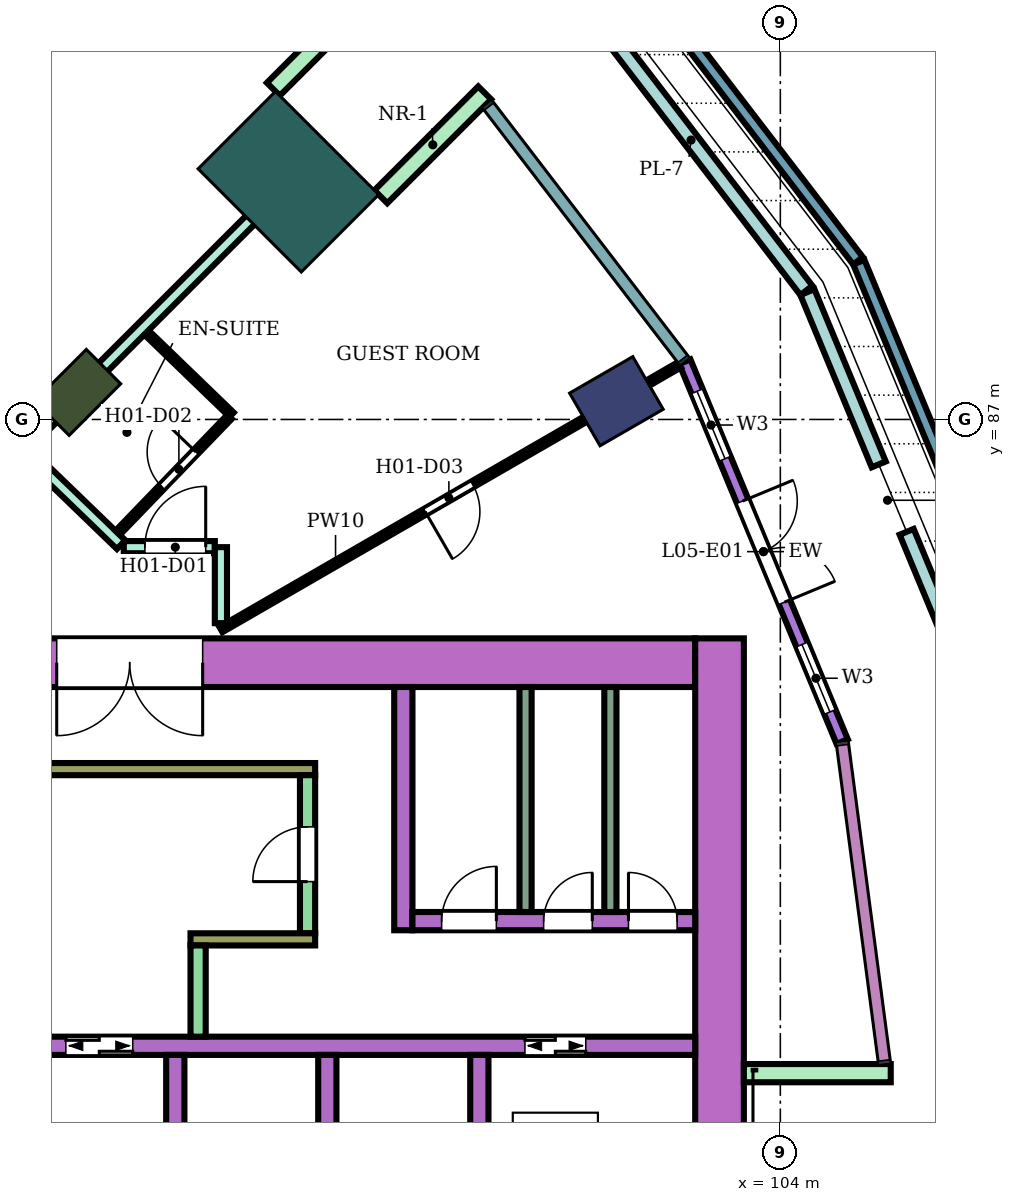
"""IFC4 building model, lengths in metres.
Left out: names, types, materials, properties, quantities, classifications, styles, units other than length and angle.
Written with IfcOpenShell. Run it as: python <this file> out.ifc"""

import sys

from ifc_helpers import new_model, si_unit, direction, frame, frame_2d, origin, origin_2d, place, context, subcontext, project, spatial, rectangle, extrude, element, fill, save


model = new_model("IFC4")
c1 = context("Model", 3, precision=1e-05, world=origin(), true_north=direction((0.0, 1.0)))
c2 = subcontext(c1, "Body", "Model", "MODEL_VIEW")
j1 = project(units=[si_unit("LENGTHUNIT", "METRE"), si_unit("PLANEANGLEUNIT", "RADIAN")], contexts=[c1])
p1 = place(None, origin())
s1 = spatial("IfcSite", under=j1, at=p1, CompositionType="ELEMENT")
p2 = place(p1, origin())
s2 = spatial("IfcBuilding", under=s1, at=p2, CompositionType="ELEMENT")
p3 = place(p2, frame((0.0, 0.0, 28.8)))
s3 = spatial("IfcBuildingStorey", under=s2, at=p3, CompositionType="ELEMENT", Elevation=28.8)
p4 = place(p3, frame((101.304, 87.3, 0.0), z_axis=(0.0, 0.0, 1.0), x_axis=(0.866025403784, 0.5, 0.0)))
e1 = element("IfcColumn", 1, at=p4, inside=s3, PredefinedType="COLUMN", context=c2, shape_type="SweptSolid", body=[
    extrude(rectangle(XDim=1.2, YDim=1.0, at=origin_2d()), origin(), (0.0, 0.0, 1.0), 3.8),
])
p5 = place(p3, frame((92.445, 87.445, 0.0), z_axis=(0.0, 0.0, 1.0), x_axis=(0.707106781187, 0.707106781187, 0.0)))
e2 = element("IfcColumn", 2, at=p5, inside=s3, PredefinedType="COLUMN", context=c2, shape_type="SweptSolid", body=[
    extrude(rectangle(XDim=1.2, YDim=0.8, at=origin_2d()), origin(), (0.0, 0.0, 1.0), 3.8),
])
p6 = place(p3, frame((95.91, 90.91, 0.0), z_axis=(0.0, 0.0, 1.0), x_axis=(0.707106781187, 0.707106781187, 0.0)))
e3 = element("IfcColumn", 3, at=p6, inside=s3, PredefinedType="COLUMN", context=c2, shape_type="SweptSolid", body=[
    extrude(rectangle(XDim=1.8, YDim=2.4, at=origin_2d()), origin(), (0.0, 0.0, 1.0), 3.8),
])
p7 = place(p3, frame((87.9, 83.0, 0.0), z_axis=(0.0, 0.0, 1.0), x_axis=(1.0, 0.0, 0.0)))
e4 = element("IfcWall", 4, at=p7, inside=s3, PredefinedType="SHEAR", context=c2, shape_type="SweptSolid", body=[
    extrude(rectangle(XDim=14.7, YDim=0.8, at=frame_2d((7.35, 0.0))), origin(), (0.0, 0.0, 1.0), 3.48),
])
p8 = place(p7, frame((4.2, 0.0, 0.0)))
e5 = element("IfcOpeningElement", 5, at=p8, cuts=e4, PredefinedType="OPENING", context=c2, shape_type="SweptSolid", body=[
    extrude(rectangle(XDim=2.4, YDim=2.4, at=frame_2d((1.2, 1.2))), frame((0.0, 0.41, 0.0), z_axis=(0.0, -1.0, 0.0), x_axis=(1.0, 0.0, 0.0)), (0.0, 0.0, 1.0), 0.82),
])
p9 = place(p3, frame((103.0, 66.6, 0.0), z_axis=(0.0, 0.0, 1.0), x_axis=(0.0, 1.0, 0.0)))
e6 = element("IfcWall", 6, at=p9, inside=s3, PredefinedType="SHEAR", context=c2, shape_type="SweptSolid", body=[
    extrude(rectangle(XDim=16.8, YDim=0.8, at=frame_2d((8.4, 0.0))), origin(), (0.0, 0.0, 1.0), 3.48),
])
p10 = place(p3, frame((91.7, 76.7, 0.0), z_axis=(0.0, 0.0, 1.0), x_axis=(1.0, 0.0, 0.0)))
e7 = element("IfcWall", 7, at=p10, inside=s3, PredefinedType="SHEAR", context=c2, shape_type="SweptSolid", body=[
    extrude(rectangle(XDim=10.9, YDim=0.3, at=frame_2d((5.45, 0.0))), origin(), (0.0, 0.0, 1.0), 3.48),
])
p11 = place(p10, frame((0.55, 0.0, 0.0)))
e8 = element("IfcOpeningElement", 8, at=p11, cuts=e7, PredefinedType="OPENING", context=c2, shape_type="SweptSolid", body=[
    extrude(rectangle(XDim=1.1, YDim=2.1, at=frame_2d((0.55, 1.05))), frame((0.0, 0.16, 0.0), z_axis=(0.0, -1.0, 0.0), x_axis=(1.0, 0.0, 0.0)), (0.0, 0.0, 1.0), 0.32),
])
p12 = place(p10, frame((8.1, 0.0, 0.0)))
e9 = element("IfcOpeningElement", 9, at=p12, cuts=e7, PredefinedType="OPENING", context=c2, shape_type="SweptSolid", body=[
    extrude(rectangle(XDim=1.0, YDim=2.1, at=frame_2d((0.5, 1.05))), frame((0.0, 0.16, 0.0), z_axis=(0.0, -1.0, 0.0), x_axis=(1.0, 0.0, 0.0)), (0.0, 0.0, 1.0), 0.32),
])
for number, where, z_axis, x_axis in (
    (10, (94.05, 74.0, 0.0), (0.0, 0.0, 1.0), (0.0, 1.0, 0.0)),
    (11, (96.55, 74.0, 0.0), (0.0, 0.0, 1.0), (0.0, 1.0, 0.0)),
    (12, (99.05, 74.0, 0.0), (0.0, 0.0, 1.0), (0.0, 1.0, 0.0)),
):
    element("IfcWall", number, at=place(p3, frame(where, z_axis=z_axis, x_axis=x_axis)), inside=s3, PredefinedType="SHEAR", context=c2, shape_type="SweptSolid", body=[
        extrude(rectangle(XDim=2.55, YDim=0.3, at=frame_2d((1.275, 0.0))), origin(), (0.0, 0.0, 1.0), 3.48),
    ])
p13 = place(p3, frame((91.7, 81.25, 0.0), z_axis=(0.0, 0.0, 1.0), x_axis=(1.0, 0.0, 0.0)))
e13 = element("IfcWall", 13, at=p13, inside=s3, PredefinedType="SHEAR", context=c2, shape_type="SweptSolid", body=[
    extrude(rectangle(XDim=4.65, YDim=0.2, at=frame_2d((2.325, 0.0))), origin(), (0.0, 0.0, 1.0), 3.48),
])
p14 = place(p3, frame((96.225, 78.55, 0.0), z_axis=(0.0, 0.0, 1.0), x_axis=(0.0, 1.0, 0.0)))
e14 = element("IfcWall", 14, at=p14, inside=s3, PredefinedType="SHEAR", context=c2, shape_type="SweptSolid", body=[
    extrude(rectangle(XDim=2.6, YDim=0.25, at=frame_2d((1.3, 0.0))), origin(), (0.0, 0.0, 1.0), 3.48),
])
p15 = place(p14, frame((0.85, 0.0, 0.0)))
e15 = element("IfcOpeningElement", 15, at=p15, cuts=e14, PredefinedType="OPENING", context=c2, shape_type="SweptSolid", body=[
    extrude(rectangle(XDim=0.9, YDim=2.1, at=frame_2d((0.45, 1.05))), frame((0.0, 0.135, 0.0), z_axis=(0.0, -1.0, 0.0), x_axis=(1.0, 0.0, 0.0)), (0.0, 0.0, 1.0), 0.27),
])
p16 = place(p3, frame((94.3, 78.45, 0.0), z_axis=(0.0, 0.0, 1.0), x_axis=(1.0, 0.0, 0.0)))
e16 = element("IfcWall", 16, at=p16, inside=s3, PredefinedType="SHEAR", context=c2, shape_type="SweptSolid", body=[
    extrude(rectangle(XDim=2.05, YDim=0.2, at=frame_2d((1.025, 0.0))), origin(), (0.0, 0.0, 1.0), 3.48),
])
p17 = place(p3, frame((94.425, 76.85, 0.0), z_axis=(0.0, 0.0, 1.0), x_axis=(0.0, 1.0, 0.0)))
e17 = element("IfcWall", 17, at=p17, inside=s3, PredefinedType="SHEAR", context=c2, shape_type="SweptSolid", body=[
    extrude(rectangle(XDim=1.5, YDim=0.25, at=frame_2d((0.75, 0.0))), origin(), (0.0, 0.0, 1.0), 3.48),
])
p18 = place(p3, frame((97.8, 78.6, 0.0), z_axis=(0.0, 0.0, 1.0), x_axis=(0.0, 1.0, 0.0)))
e18 = element("IfcWall", 18, at=p18, inside=s3, PredefinedType="SHEAR", context=c2, shape_type="SweptSolid", body=[
    extrude(rectangle(XDim=4.0, YDim=0.3, at=frame_2d((2.0, 0.0))), origin(), (0.0, 0.0, 1.0), 3.48),
])
p19 = place(p3, frame((97.95, 78.75, 0.0), z_axis=(0.0, 0.0, 1.0), x_axis=(1.0, 0.0, 0.0)))
e19 = element("IfcWall", 19, at=p19, inside=s3, PredefinedType="SHEAR", context=c2, shape_type="SweptSolid", body=[
    extrude(rectangle(XDim=4.65, YDim=0.3, at=frame_2d((2.325, 0.0))), origin(), (0.0, 0.0, 1.0), 3.48),
])
p20 = place(p19, frame((0.48, 0.0, 0.0)))
e20 = element("IfcOpeningElement", 20, at=p20, cuts=e19, PredefinedType="OPENING", context=c2, shape_type="SweptSolid", body=[
    extrude(rectangle(XDim=0.9, YDim=2.1, at=frame_2d((0.45, 1.05))), frame((0.0, 0.16, 0.0), z_axis=(0.0, -1.0, 0.0), x_axis=(1.0, 0.0, 0.0)), (0.0, 0.0, 1.0), 0.32),
])
p21 = place(p19, frame((2.157, 0.0, 0.0)))
e21 = element("IfcOpeningElement", 21, at=p21, cuts=e19, PredefinedType="OPENING", context=c2, shape_type="SweptSolid", body=[
    extrude(rectangle(XDim=0.8, YDim=2.1, at=frame_2d((0.4, 1.05))), frame((0.0, 0.16, 0.0), z_axis=(0.0, -1.0, 0.0), x_axis=(1.0, 0.0, 0.0)), (0.0, 0.0, 1.0), 0.32),
])
p22 = place(p19, frame((3.552, 0.0, 0.0)))
e22 = element("IfcOpeningElement", 22, at=p22, cuts=e19, PredefinedType="OPENING", context=c2, shape_type="SweptSolid", body=[
    extrude(rectangle(XDim=0.8, YDim=2.1, at=frame_2d((0.4, 1.05))), frame((0.0, 0.16, 0.0), z_axis=(0.0, -1.0, 0.0), x_axis=(1.0, 0.0, 0.0)), (0.0, 0.0, 1.0), 0.32),
])
p23 = place(p3, frame((105.017, 81.703, 0.0), z_axis=(0.0, 0.0, 1.0), x_axis=(-0.382694096902, 0.923875115043, 0.0)))
e23 = element("IfcWall", 23, at=p23, inside=s3, PredefinedType="NOTDEFINED", context=c2, shape_type="SweptSolid", body=[
    extrude(rectangle(XDim=6.761, YDim=0.2, at=frame_2d((3.38, 0.0))), origin(), (0.0, 0.0, 1.0), 3.8),
])
p24 = place(p23, frame((0.527, 0.0, 0.9)))
e24 = element("IfcOpeningElement", 24, at=p24, cuts=e23, PredefinedType="OPENING", context=c2, shape_type="SweptSolid", body=[
    extrude(rectangle(XDim=1.2, YDim=2.4, at=frame_2d((0.6, 1.2))), frame((0.0, 0.11, 0.0), z_axis=(0.0, -1.0, 0.0), x_axis=(1.0, 0.0, 0.0)), (0.0, 0.0, 1.0), 0.22),
])
p25 = place(p23, frame((2.48, 0.0, 0.0)))
e25 = element("IfcOpeningElement", 25, at=p25, cuts=e23, PredefinedType="OPENING", context=c2, shape_type="SweptSolid", body=[
    extrude(rectangle(XDim=1.8, YDim=2.4, at=frame_2d((0.9, 1.2))), frame((0.0, 0.11, 0.0), z_axis=(0.0, -1.0, 0.0), x_axis=(1.0, 0.0, 0.0)), (0.0, 0.0, 1.0), 0.22),
])
p26 = place(p23, frame((5.034, 0.0, 0.9)))
e26 = element("IfcOpeningElement", 26, at=p26, cuts=e23, PredefinedType="OPENING", context=c2, shape_type="SweptSolid", body=[
    extrude(rectangle(XDim=1.2, YDim=2.4, at=frame_2d((0.6, 1.2))), frame((0.0, 0.11, 0.0), z_axis=(0.0, -1.0, 0.0), x_axis=(1.0, 0.0, 0.0)), (0.0, 0.0, 1.0), 0.22),
])
for number, where, z_axis, x_axis in (
    (27, (103.4, 76.25, 0.0), (0.0, 0.0, 1.0), (1.0, 0.0, 0.0)),
    (28, (97.43, 90.662, 0.0), (0.0, 0.0, 1.0), (0.707, 0.707, 0.0)),
    (29, (95.662, 92.43, 0.0), (0.0, 0.0, 1.0), (0.707, 0.707, 0.0)),
):
    element("IfcWall", number, at=place(p3, frame(where, z_axis=z_axis, x_axis=x_axis)), inside=s3, PredefinedType="NOTDEFINED", context=c2, shape_type="SweptSolid", body=[
        extrude(rectangle(XDim=2.416, YDim=0.3, at=frame_2d((1.208, 0.0))), origin(), (0.0, 0.0, 1.0), 3.8),
    ])
p27 = place(p3, frame((100.654, 95.635, 0.0), z_axis=(0.0, 0.0, 1.0), x_axis=(0.608742572971, -0.793367808682, 0.0)))
e30 = element("IfcWall", 30, at=p27, inside=s3, PredefinedType="PARAPET", context=c2, shape_type="SweptSolid", body=[
    extrude(rectangle(XDim=7.596, YDim=0.2, at=frame_2d((3.798, 0.0))), origin(), (0.0, 0.0, 1.0), 1.1),
])
p28 = place(p3, frame((105.291, 89.586, 0.0), z_axis=(0.0, 0.0, 1.0), x_axis=(0.382690553965, -0.923876582616, 0.0)))
e31 = element("IfcWall", 31, at=p28, inside=s3, PredefinedType="PARAPET", context=c2, shape_type="SweptSolid", body=[
    extrude(rectangle(XDim=7.595, YDim=0.2, at=frame_2d((3.798, 0.0))), origin(), (0.0, 0.0, 1.0), 1.1),
])
p29 = place(p3, frame((100.635, 94.067, 0.0), z_axis=(0.0, 0.0, 1.0), x_axis=(0.608758005668, -0.793355967101, 0.0)))
e32 = element("IfcWall", 32, at=p29, inside=s3, PredefinedType="USERDEFINED", context=c2, shape_type="SweptSolid", body=[
    extrude(rectangle(XDim=6.232, YDim=0.25, at=frame_2d((3.116, 0.0))), origin(), (0.0, 0.0, 1.0), 0.6),
])
for number, where, z_axis, x_axis in (
    (33, (104.445, 89.094, 0.0), (0.0, 0.0, 1.0), (0.383, -0.924, 0.0)),
    (34, (106.077, 85.152, 0.0), (0.0, 0.0, 1.0), (0.383, -0.924, 0.0)),
):
    element("IfcWall", number, at=place(p3, frame(where, z_axis=z_axis, x_axis=x_axis)), inside=s3, PredefinedType="USERDEFINED", context=c2, shape_type="SweptSolid", body=[
        extrude(rectangle(XDim=3.067, YDim=0.25, at=frame_2d((1.533, 0.0))), origin(), (0.0, 0.0, 1.0), 0.6),
    ])
p30 = place(p3, frame((88.465, 89.473, 0.0), z_axis=(0.0, 0.0, 1.0), x_axis=(0.719457552421, -0.694536413922, 0.0)))
e35 = element("IfcWall", 35, at=p30, inside=s3, PredefinedType="PARTITIONING", context=c2, shape_type="SweptSolid", body=[
    extrude(rectangle(XDim=6.524, YDim=0.2, at=frame_2d((3.262, 0.0))), origin(), (0.0, 0.0, 1.0), 3.35),
])
p31 = place(p30, frame((2.719, 0.0, 0.0)))
e36 = element("IfcOpeningElement", 36, at=p31, cuts=e35, PredefinedType="OPENING", context=c2, shape_type="SweptSolid", body=[
    extrude(rectangle(XDim=1.0, YDim=2.1, at=frame_2d((0.5, 1.05))), frame((0.0, 0.11, 0.0), z_axis=(0.0, -1.0, 0.0), x_axis=(1.0, 0.0, 0.0)), (0.0, 0.0, 1.0), 0.22),
])
p32 = place(p3, frame((88.4, 89.538, 0.0), z_axis=(0.0, 0.0, 1.0), x_axis=(0.5002401188, 0.865886726739, 0.0)))
e37 = element("IfcWall", 37, at=p32, inside=s3, PredefinedType="PARTITIONING", context=c2, shape_type="SweptSolid", body=[
    extrude(rectangle(XDim=9.008, YDim=0.2, at=frame_2d((4.504, 0.0))), origin(), (0.0, 0.0, 1.0), 3.35),
])
p33 = place(p3, frame((91.594, 86.591, 0.0), z_axis=(0.0, 0.0, 1.0), x_axis=(0.707214399597, 0.706999146394, 0.0)))
e38 = element("IfcWall", 38, at=p33, inside=s3, PredefinedType="PARTITIONING", context=c2, shape_type="SweptSolid", body=[
    extrude(rectangle(XDim=6.805, YDim=0.2, at=frame_2d((3.403, 0.0))), origin(), (0.0, 0.0, 1.0), 3.35),
])
p34 = place(p3, frame((93.203, 84.9, 0.0), z_axis=(0.0, 0.0, 1.0), x_axis=(1.0, 0.0, 0.0)))
e39 = element("IfcWall", 39, at=p34, inside=s3, PredefinedType="PARTITIONING", context=c2, shape_type="SweptSolid", body=[
    extrude(rectangle(XDim=1.497, YDim=0.2, at=frame_2d((0.749, 0.0))), origin(), (0.0, 0.0, 1.0), 3.35),
])
p35 = place(p34, frame((0.347, 0.0, 0.0)))
e40 = element("IfcOpeningElement", 40, at=p35, cuts=e39, PredefinedType="OPENING", context=c2, shape_type="SweptSolid", body=[
    extrude(rectangle(XDim=1.0, YDim=2.1, at=frame_2d((0.5, 1.05))), frame((0.0, 0.11, 0.0), z_axis=(0.0, -1.0, 0.0), x_axis=(1.0, 0.0, 0.0)), (0.0, 0.0, 1.0), 0.22),
])
p36 = place(p3, frame((94.8, 83.65, 0.0), z_axis=(0.0, 0.0, 1.0), x_axis=(0.0, 1.0, 0.0)))
e41 = element("IfcWall", 41, at=p36, inside=s3, PredefinedType="PARTITIONING", context=c2, shape_type="SweptSolid", body=[
    extrude(rectangle(XDim=1.25, YDim=0.2, at=frame_2d((0.625, 0.0))), origin(), (0.0, 0.0, 1.0), 3.35),
])
p37 = place(p3, frame((93.103, 85.136, 0.0), z_axis=(0.0, 0.0, 1.0), x_axis=(0.694324808789, 0.719661767708, 0.0)))
e42 = element("IfcWall", 42, at=p37, inside=s3, PredefinedType="PARTITIONING", context=c2, shape_type="SweptSolid", body=[
    extrude(rectangle(XDim=2.65, YDim=0.1, at=frame_2d((1.325, 0.0))), origin(), (0.0, 0.0, 1.0), 3.35),
])
p38 = place(p37, frame((1.05, 0.0, 0.0)))
e43 = element("IfcOpeningElement", 43, at=p38, cuts=e42, PredefinedType="OPENING", context=c2, shape_type="SweptSolid", body=[
    extrude(rectangle(XDim=0.8, YDim=2.1, at=frame_2d((0.4, 1.05))), frame((0.0, 0.06, 0.0), z_axis=(0.0, -1.0, 0.0), x_axis=(1.0, 0.0, 0.0)), (0.0, 0.0, 1.0), 0.12),
])
p39 = place(p3, frame((93.581, 88.425, 0.0), z_axis=(0.0, 0.0, 1.0), x_axis=(0.719336381931, -0.694661910307, 0.0)))
e44 = element("IfcWall", 44, at=p39, inside=s3, PredefinedType="PARTITIONING", context=c2, shape_type="SweptSolid", body=[
    extrude(rectangle(XDim=1.939, YDim=0.1, at=frame_2d((0.97, 0.0))), origin(), (0.0, 0.0, 1.0), 3.35),
])
p40 = place(p3, frame((94.8, 83.545, 0.0), z_axis=(0.0, 0.0, 1.0), x_axis=(0.86602264145, 0.500004784474, 0.0)))
e45 = element("IfcWall", 45, at=p40, inside=s3, PredefinedType="PARTITIONING", context=c2, shape_type="SweptSolid", body=[
    extrude(rectangle(XDim=8.708, YDim=0.1, at=frame_2d((4.354, 0.0))), origin(), (0.0, 0.0, 1.0), 3.35),
])
p41 = place(p40, frame((3.879, 0.0, 0.0)))
e46 = element("IfcOpeningElement", 46, at=p41, cuts=e45, PredefinedType="OPENING", context=c2, shape_type="SweptSolid", body=[
    extrude(rectangle(XDim=0.9, YDim=2.1, at=frame_2d((0.45, 1.05))), frame((0.0, 0.06, 0.0), z_axis=(0.0, -1.0, 0.0), x_axis=(1.0, 0.0, 0.0)), (0.0, 0.0, 1.0), 0.12),
])
for number, where, z_axis, x_axis in (
    (47, (99.81, 78.9, 0.0), (0.0, 0.0, 1.0), (0.0, 1.0, 0.0)),
    (48, (101.205, 78.9, 0.0), (0.0, 0.0, 1.0), (0.0, 1.0, 0.0)),
):
    element("IfcWall", number, at=place(p3, frame(where, z_axis=z_axis, x_axis=x_axis)), inside=s3, PredefinedType="PARTITIONING", context=c2, shape_type="SweptSolid", body=[
        extrude(rectangle(XDim=3.7, YDim=0.2, at=frame_2d((1.85, 0.0))), origin(), (0.0, 0.0, 1.0), 3.48),
    ])
p42 = place(p24, origin())
e49 = element("IfcWindow", 49, at=p42, inside=s3, PartitioningType="SINGLE_PANEL", PredefinedType="WINDOW", context=c2, shape_type="SweptSolid", body=[
    extrude(rectangle(XDim=1.2, YDim=2.4, at=frame_2d((0.6, 1.2))), frame((0.0, 0.03, 0.0), z_axis=(0.0, -1.0, 0.0), x_axis=(1.0, 0.0, 0.0)), (0.0, 0.0, 1.0), 0.06),
])
fill(e24, e49)
p43 = place(p25, frame((1.8, 0.0, 0.0), z_axis=(0.0, 0.0, 1.0), x_axis=(-1.0, 0.0, 0.0)))
e50 = element("IfcDoor", 50, at=p43, inside=s3, OperationType="DOUBLE_DOOR_SINGLE_SWING", PredefinedType="DOOR", context=c2, shape_type="SweptSolid", body=[
    extrude(rectangle(XDim=1.8, YDim=2.4, at=frame_2d((0.9, 1.2))), frame((0.0, 0.025, 0.0), z_axis=(0.0, -1.0, 0.0), x_axis=(1.0, 0.0, 0.0)), (0.0, 0.0, 1.0), 0.05),
])
fill(e25, e50)
p44 = place(p26, origin())
e51 = element("IfcWindow", 51, at=p44, inside=s3, PartitioningType="SINGLE_PANEL", PredefinedType="WINDOW", context=c2, shape_type="SweptSolid", body=[
    extrude(rectangle(XDim=1.2, YDim=2.4, at=frame_2d((0.6, 1.2))), frame((0.0, 0.03, 0.0), z_axis=(0.0, -1.0, 0.0), x_axis=(1.0, 0.0, 0.0)), (0.0, 0.0, 1.0), 0.06),
])
fill(e26, e51)
p45 = place(p35, origin())
e52 = element("IfcDoor", 52, at=p45, inside=s3, OperationType="SINGLE_SWING_RIGHT", PredefinedType="DOOR", context=c2, shape_type="SweptSolid", body=[
    extrude(rectangle(XDim=1.0, YDim=2.1, at=frame_2d((0.5, 1.05))), frame((0.0, 0.025, 0.0), z_axis=(0.0, -1.0, 0.0), x_axis=(1.0, 0.0, 0.0)), (0.0, 0.0, 1.0), 0.05),
])
fill(e40, e52)
p46 = place(p38, origin())
e53 = element("IfcDoor", 53, at=p46, inside=s3, OperationType="SINGLE_SWING_RIGHT", PredefinedType="DOOR", context=c2, shape_type="SweptSolid", body=[
    extrude(rectangle(XDim=0.8, YDim=2.1, at=frame_2d((0.4, 1.05))), frame((0.0, 0.025, 0.0), z_axis=(0.0, -1.0, 0.0), x_axis=(1.0, 0.0, 0.0)), (0.0, 0.0, 1.0), 0.05),
])
fill(e43, e53)
p47 = place(p41, frame((0.9, 0.0, 0.0), z_axis=(0.0, 0.0, 1.0), x_axis=(-1.0, 0.0, 0.0)))
e54 = element("IfcDoor", 54, at=p47, inside=s3, OperationType="SINGLE_SWING_RIGHT", PredefinedType="DOOR", context=c2, shape_type="SweptSolid", body=[
    extrude(rectangle(XDim=0.9, YDim=2.1, at=frame_2d((0.45, 1.05))), frame((0.0, 0.025, 0.0), z_axis=(0.0, -1.0, 0.0), x_axis=(1.0, 0.0, 0.0)), (0.0, 0.0, 1.0), 0.05),
])
fill(e46, e54)
p48 = place(p11, origin())
e55 = element("IfcDoor", 55, at=p48, inside=s3, OperationType="DOUBLE_DOOR_SLIDING", PredefinedType="DOOR", context=c2, shape_type="SweptSolid", body=[
    extrude(rectangle(XDim=1.1, YDim=2.1, at=frame_2d((0.55, 1.05))), frame((0.0, 0.025, 0.0), z_axis=(0.0, -1.0, 0.0), x_axis=(1.0, 0.0, 0.0)), (0.0, 0.0, 1.0), 0.05),
])
fill(e8, e55)
p49 = place(p12, origin())
e56 = element("IfcDoor", 56, at=p49, inside=s3, OperationType="DOUBLE_DOOR_SLIDING", PredefinedType="DOOR", context=c2, shape_type="SweptSolid", body=[
    extrude(rectangle(XDim=1.0, YDim=2.1, at=frame_2d((0.5, 1.05))), frame((0.0, 0.025, 0.0), z_axis=(0.0, -1.0, 0.0), x_axis=(1.0, 0.0, 0.0)), (0.0, 0.0, 1.0), 0.05),
])
fill(e9, e56)
p50 = place(p15, origin())
e57 = element("IfcDoor", 57, at=p50, inside=s3, OperationType="SINGLE_SWING_LEFT", PredefinedType="DOOR", context=c2, shape_type="SweptSolid", body=[
    extrude(rectangle(XDim=0.9, YDim=2.1, at=frame_2d((0.45, 1.05))), frame((0.0, 0.025, 0.0), z_axis=(0.0, -1.0, 0.0), x_axis=(1.0, 0.0, 0.0)), (0.0, 0.0, 1.0), 0.05),
])
fill(e15, e57)
p51 = place(p20, origin())
e58 = element("IfcDoor", 58, at=p51, inside=s3, OperationType="SINGLE_SWING_RIGHT", PredefinedType="DOOR", context=c2, shape_type="SweptSolid", body=[
    extrude(rectangle(XDim=0.9, YDim=2.1, at=frame_2d((0.45, 1.05))), frame((0.0, 0.025, 0.0), z_axis=(0.0, -1.0, 0.0), x_axis=(1.0, 0.0, 0.0)), (0.0, 0.0, 1.0), 0.05),
])
fill(e20, e58)
p52 = place(p21, origin())
e59 = element("IfcDoor", 59, at=p52, inside=s3, OperationType="SINGLE_SWING_RIGHT", PredefinedType="DOOR", context=c2, shape_type="SweptSolid", body=[
    extrude(rectangle(XDim=0.8, YDim=2.1, at=frame_2d((0.4, 1.05))), frame((0.0, 0.025, 0.0), z_axis=(0.0, -1.0, 0.0), x_axis=(1.0, 0.0, 0.0)), (0.0, 0.0, 1.0), 0.05),
])
fill(e21, e59)
p53 = place(p22, origin())
e60 = element("IfcDoor", 60, at=p53, inside=s3, OperationType="SINGLE_SWING_LEFT", PredefinedType="DOOR", context=c2, shape_type="SweptSolid", body=[
    extrude(rectangle(XDim=0.8, YDim=2.1, at=frame_2d((0.4, 1.05))), frame((0.0, 0.025, 0.0), z_axis=(0.0, -1.0, 0.0), x_axis=(1.0, 0.0, 0.0)), (0.0, 0.0, 1.0), 0.05),
])
fill(e22, e60)
p54 = place(p8, frame((2.4, 0.0, 0.0), z_axis=(0.0, 0.0, 1.0), x_axis=(-1.0, 0.0, 0.0)))
e61 = element("IfcDoor", 61, at=p54, inside=s3, OperationType="DOUBLE_DOOR_SINGLE_SWING", PredefinedType="DOOR", context=c2, shape_type="SweptSolid", body=[
    extrude(rectangle(XDim=2.4, YDim=2.4, at=frame_2d((1.2, 1.2))), frame((0.0, 0.025, 0.0), z_axis=(0.0, -1.0, 0.0), x_axis=(1.0, 0.0, 0.0)), (0.0, 0.0, 1.0), 0.05),
])
fill(e5, e61)
save(model, sys.argv[1])
